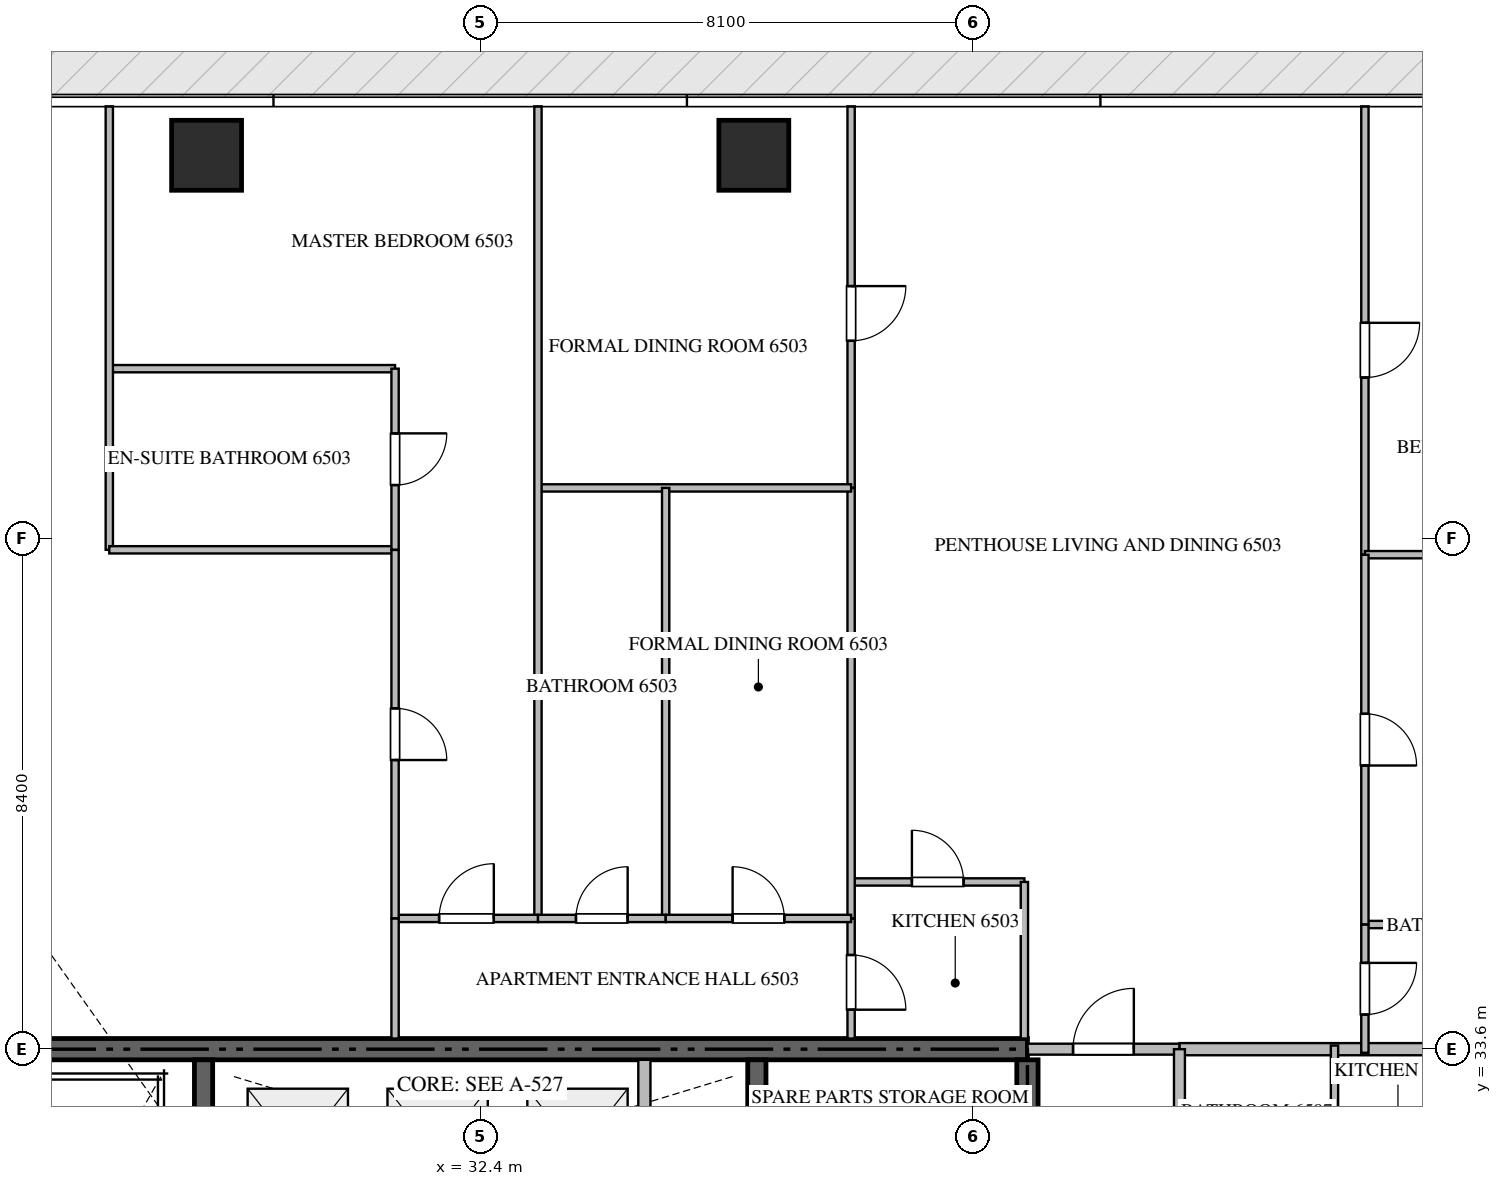
"""IFC4 building model, lengths in metres.
Left out: names, types, materials, properties, quantities, classifications, styles, units other than length and angle.
Written with IfcOpenShell. Run it as: python <this file> out.ifc"""

import sys

from ifc_helpers import new_model, si_unit, direction, frame, frame_2d, origin, origin_2d, place, context, subcontext, project, spatial, rectangle, extrude, source, transform, mapped, element, fill, save


model = new_model("IFC4")
c1 = context("Model", 3, precision=1e-05, world=origin(), true_north=direction((0.0, 1.0)))
c2 = subcontext(c1, "Body", "Model", "MODEL_VIEW")
j1 = project(units=[si_unit("LENGTHUNIT", "METRE"), si_unit("PLANEANGLEUNIT", "RADIAN")], contexts=[c1])
p1 = place(None, origin())
s1 = spatial("IfcSite", under=j1, at=p1, CompositionType="ELEMENT")
p2 = place(p1, origin())
s2 = spatial("IfcBuilding", under=s1, at=p2, CompositionType="ELEMENT")
p3 = place(p2, frame((0.0, 0.0, 260.5)))
s3 = spatial("IfcBuildingStorey", under=s2, at=p3, CompositionType="ELEMENT", Elevation=260.5)
p4 = place(p3, frame((41.4, 33.6, -0.26), z_axis=(0.0, 0.0, 1.0), x_axis=(-1.0, 0.0, 0.0)))
e1 = element("IfcWall", 1, at=p4, inside=s3, PredefinedType="SHEAR", context=c2, shape_type="SweptSolid", body=[
    extrude(rectangle(XDim=18.0, YDim=0.35, at=frame_2d((9.0, 0.0))), origin(), (0.0, 0.0, 1.0), 3.848),
])
p5 = place(p3, frame((41.4, 27.75, -0.26), z_axis=(0.0, 0.0, 1.0), x_axis=(0.0, 1.0, 0.0)))
e2 = element("IfcWall", 2, at=p5, inside=s3, PredefinedType="SHEAR", context=c2, shape_type="SweptSolid", body=[
    extrude(rectangle(XDim=5.675, YDim=0.35, at=frame_2d((2.837, 0.0))), origin(), (0.0, 0.0, 1.0), 3.848),
])
p6 = place(p3, frame((27.85, 23.55, -0.26), z_axis=(0.0, 0.0, 1.0), x_axis=(0.0, 1.0, 0.0)))
e3 = element("IfcWall", 3, at=p6, inside=s3, PredefinedType="SHEAR", context=c2, shape_type="SweptSolid", body=[
    extrude(rectangle(XDim=9.875, YDim=0.3, at=frame_2d((4.938, 0.0))), origin(), (0.0, 0.0, 1.0), 3.848),
])
p7 = place(p3, frame((36.95, 27.05, -0.26), z_axis=(0.0, 0.0, 1.0), x_axis=(0.0, 1.0, 0.0)))
e4 = element("IfcWall", 4, at=p7, inside=s3, PredefinedType="SHEAR", context=c2, shape_type="SweptSolid", body=[
    extrude(rectangle(XDim=6.375, YDim=0.3, at=frame_2d((3.188, 0.0))), origin(), (0.0, 0.0, 1.0), 3.848),
])
m1 = source(origin(), c2, "Body", "SweptSolid", [
    extrude(rectangle(XDim=1.15, YDim=1.15, at=origin_2d()), origin(), (0.0, 0.0, 1.0), 3.85),
])
for number, where, z_axis, x_axis in (
    (5, (27.9, 48.3, -0.26), (0.0, 0.0, 1.0), (1.0, 0.0, 0.0)),
    (6, (36.9, 48.3, -0.26), (0.0, 0.0, 1.0), (1.0, 0.0, 0.0)),
):
    element("IfcColumn", number, at=place(p3, frame(where, z_axis=z_axis, x_axis=x_axis)), inside=s3, PredefinedType="COLUMN", context=c2, shape_type="MappedRepresentation", body=[
        mapped(m1, transform((0.0, 0.0, 0.0), scale=1.0)),
    ])
p8 = place(p3, frame((35.1, 30.75, 0.0), z_axis=(0.0, 0.0, 1.0), x_axis=(0.0, 1.0, 0.0)))
e7 = element("IfcWall", 7, at=p8, inside=s3, PredefinedType="STANDARD", context=c2, shape_type="SweptSolid", body=[
    extrude(rectangle(XDim=2.675, YDim=0.2, at=frame_2d((1.337, 0.0))), origin(), (0.0, 0.0, 1.0), 3.59),
])
p9 = place(p3, frame((43.9, 33.6, 0.0), z_axis=(0.0, 0.0, 1.0), x_axis=(1.0, 0.0, 0.0)))
e8 = element("IfcWall", 8, at=p9, inside=s3, PredefinedType="PARTITIONING", context=c2, shape_type="SweptSolid", body=[
    extrude(rectangle(XDim=13.418, YDim=0.2, at=frame_2d((6.709, 0.0))), origin(), (0.0, 0.0, 1.0), 3.59),
])
p10 = place(p3, frame((41.402, 33.6, 0.0), z_axis=(0.0, 0.0, 1.0), x_axis=(1.0, 0.0, 0.0)))
e9 = element("IfcWall", 9, at=p10, inside=s3, PredefinedType="PARTITIONING", context=c2, shape_type="SweptSolid", body=[
    extrude(rectangle(XDim=2.496, YDim=0.18, at=frame_2d((1.248, 0.0))), origin(), (0.0, 0.0, 1.0), 3.59),
])
p11 = place(p10, frame((0.748, 0.0, 0.0)))
e10 = element("IfcOpeningElement", 10, at=p11, cuts=e9, PredefinedType="OPENING", context=c2, shape_type="SweptSolid", body=[
    extrude(rectangle(XDim=1.0, YDim=2.15, at=frame_2d((0.5, 1.075))), frame((0.0, 0.1, 0.0), z_axis=(0.0, -1.0, 0.0), x_axis=(1.0, 0.0, 0.0)), (0.0, 0.0, 1.0), 0.2),
])
p12 = place(p3, frame((43.9, 16.8, 0.0), z_axis=(0.0, 0.0, 1.0), x_axis=(0.0, 1.0, 0.0)))
e11 = element("IfcWall", 11, at=p12, inside=s3, PredefinedType="PARTITIONING", context=c2, shape_type="SweptSolid", body=[
    extrude(rectangle(XDim=16.8, YDim=0.18, at=frame_2d((8.4, 0.0))), origin(), (0.0, 0.0, 1.0), 3.59),
])
p13 = place(p12, frame((2.575, 0.0, 0.0)))
e12 = element("IfcOpeningElement", 12, at=p13, cuts=e11, PredefinedType="OPENING", context=c2, shape_type="SweptSolid", body=[
    extrude(rectangle(XDim=1.0, YDim=2.15, at=frame_2d((0.5, 1.075))), frame((0.0, 0.1, 0.0), z_axis=(0.0, -1.0, 0.0), x_axis=(1.0, 0.0, 0.0)), (0.0, 0.0, 1.0), 0.2),
])
p14 = place(p12, frame((10.997, 0.0, 0.0)))
e13 = element("IfcOpeningElement", 13, at=p14, cuts=e11, PredefinedType="OPENING", context=c2, shape_type="SweptSolid", body=[
    extrude(rectangle(XDim=1.0, YDim=2.15, at=frame_2d((0.5, 1.075))), frame((0.0, 0.1, 0.0), z_axis=(0.0, -1.0, 0.0), x_axis=(1.0, 0.0, 0.0)), (0.0, 0.0, 1.0), 0.2),
])
p15 = place(p3, frame((38.5, 36.35, 0.0), z_axis=(0.0, 0.0, 1.0), x_axis=(1.0, 0.0, 0.0)))
e14 = element("IfcWall", 14, at=p15, inside=s3, PredefinedType="PARTITIONING", context=c2, shape_type="SweptSolid", body=[
    extrude(rectangle(XDim=2.85, YDim=0.12, at=frame_2d((1.425, 0.0))), origin(), (0.0, 0.0, 1.0), 3.59),
])
p16 = place(p15, frame((1.0, 0.0, 0.0)))
e15 = element("IfcOpeningElement", 15, at=p16, cuts=e14, PredefinedType="OPENING", context=c2, shape_type="SweptSolid", body=[
    extrude(rectangle(XDim=0.85, YDim=2.1, at=frame_2d((0.425, 1.05))), frame((0.0, 0.07, 0.0), z_axis=(0.0, -1.0, 0.0), x_axis=(1.0, 0.0, 0.0)), (0.0, 0.0, 1.0), 0.14),
])
p17 = place(p3, frame((41.35, 36.35, 0.0), z_axis=(0.0, 0.0, 1.0), x_axis=(0.0, -1.0, 0.0)))
e16 = element("IfcWall", 16, at=p17, inside=s3, PredefinedType="PARTITIONING", context=c2, shape_type="SweptSolid", body=[
    extrude(rectangle(XDim=2.575, YDim=0.12, at=frame_2d((1.288, 0.0))), origin(), (0.0, 0.0, 1.0), 3.59),
])
p18 = place(p3, frame((38.5, 35.75, 0.0), z_axis=(0.0, 0.0, 1.0), x_axis=(0.0, -1.0, 0.0)))
e17 = element("IfcWall", 17, at=p18, inside=s3, PredefinedType="PARTITIONING", context=c2, shape_type="SweptSolid", body=[
    extrude(rectangle(XDim=1.975, YDim=0.12, at=frame_2d((0.988, 0.0))), origin(), (0.0, 0.0, 1.0), 3.59),
])
p19 = place(p18, frame((0.601, 0.0, 0.0)))
e18 = element("IfcOpeningElement", 18, at=p19, cuts=e17, PredefinedType="OPENING", context=c2, shape_type="SweptSolid", body=[
    extrude(rectangle(XDim=0.9, YDim=2.1, at=frame_2d((0.45, 1.05))), frame((0.0, 0.07, 0.0), z_axis=(0.0, -1.0, 0.0), x_axis=(1.0, 0.0, 0.0)), (0.0, 0.0, 1.0), 0.14),
])
p20 = place(p3, frame((38.5, 49.105, 0.0), z_axis=(0.0, 0.0, 1.0), x_axis=(0.0, -1.0, 0.0)))
e19 = element("IfcWall", 19, at=p20, inside=s3, PredefinedType="PARTITIONING", context=c2, shape_type="SweptSolid", body=[
    extrude(rectangle(XDim=6.275, YDim=0.12, at=frame_2d((3.137, 0.0))), origin(), (0.0, 0.0, 1.0), 3.59),
])
p21 = place(p20, frame((2.956, 0.0, 0.0)))
e20 = element("IfcOpeningElement", 20, at=p21, cuts=e19, PredefinedType="OPENING", context=c2, shape_type="SweptSolid", body=[
    extrude(rectangle(XDim=0.9, YDim=2.1, at=frame_2d((0.45, 1.05))), frame((0.0, 0.07, 0.0), z_axis=(0.0, -1.0, 0.0), x_axis=(1.0, 0.0, 0.0)), (0.0, 0.0, 1.0), 0.14),
])
p22 = place(p3, frame((38.5, 42.828, 0.0), z_axis=(0.0, 0.0, 1.0), x_axis=(0.0, -1.0, 0.0)))
e21 = element("IfcWall", 21, at=p22, inside=s3, PredefinedType="PARTITIONING", context=c2, shape_type="SweptSolid", body=[
    extrude(rectangle(XDim=7.076, YDim=0.12, at=frame_2d((3.538, 0.0))), origin(), (0.0, 0.0, 1.0), 3.59),
])
p23 = place(p3, frame((33.35, 42.83, 0.0), z_axis=(0.0, 0.0, 1.0), x_axis=(1.0, 0.0, 0.0)))
e22 = element("IfcWall", 22, at=p23, inside=s3, PredefinedType="PARTITIONING", context=c2, shape_type="SweptSolid", body=[
    extrude(rectangle(XDim=5.15, YDim=0.12, at=frame_2d((2.575, 0.0))), origin(), (0.0, 0.0, 1.0), 3.59),
])
p24 = place(p3, frame((33.35, 49.105, 0.0), z_axis=(0.0, 0.0, 1.0), x_axis=(0.0, -1.0, 0.0)))
e23 = element("IfcWall", 23, at=p24, inside=s3, PredefinedType="PARTITIONING", context=c2, shape_type="SweptSolid", body=[
    extrude(rectangle(XDim=13.355, YDim=0.12, at=frame_2d((6.677, 0.0))), origin(), (0.0, 0.0, 1.0), 3.59),
])
p25 = place(p3, frame((35.45, 42.83, 0.0), z_axis=(0.0, 0.0, 1.0), x_axis=(0.0, -1.0, 0.0)))
e24 = element("IfcWall", 24, at=p25, inside=s3, PredefinedType="PARTITIONING", context=c2, shape_type="SweptSolid", body=[
    extrude(rectangle(XDim=7.08, YDim=0.12, at=frame_2d((3.54, 0.0))), origin(), (0.0, 0.0, 1.0), 3.59),
])
p26 = place(p3, frame((33.35, 35.75, 0.0), z_axis=(0.0, 0.0, 1.0), x_axis=(1.0, 0.0, 0.0)))
e25 = element("IfcWall", 25, at=p26, inside=s3, PredefinedType="PARTITIONING", context=c2, shape_type="SweptSolid", body=[
    extrude(rectangle(XDim=2.1, YDim=0.12, at=frame_2d((1.05, 0.0))), origin(), (0.0, 0.0, 1.0), 3.59),
])
p27 = place(p26, frame((0.625, 0.0, 0.0)))
e26 = element("IfcOpeningElement", 26, at=p27, cuts=e25, PredefinedType="OPENING", context=c2, shape_type="SweptSolid", body=[
    extrude(rectangle(XDim=0.85, YDim=2.1, at=frame_2d((0.425, 1.05))), frame((0.0, 0.07, 0.0), z_axis=(0.0, -1.0, 0.0), x_axis=(1.0, 0.0, 0.0)), (0.0, 0.0, 1.0), 0.14),
])
p28 = place(p3, frame((35.452, 35.75, 0.0), z_axis=(0.0, 0.0, 1.0), x_axis=(1.0, 0.0, 0.0)))
e27 = element("IfcWall", 27, at=p28, inside=s3, PredefinedType="PARTITIONING", context=c2, shape_type="SweptSolid", body=[
    extrude(rectangle(XDim=3.048, YDim=0.12, at=frame_2d((1.524, 0.0))), origin(), (0.0, 0.0, 1.0), 3.59),
])
p29 = place(p28, frame((1.099, 0.0, 0.0)))
e28 = element("IfcOpeningElement", 28, at=p29, cuts=e27, PredefinedType="OPENING", context=c2, shape_type="SweptSolid", body=[
    extrude(rectangle(XDim=0.85, YDim=2.1, at=frame_2d((0.425, 1.05))), frame((0.0, 0.07, 0.0), z_axis=(0.0, -1.0, 0.0), x_axis=(1.0, 0.0, 0.0)), (0.0, 0.0, 1.0), 0.14),
])
p30 = place(p3, frame((31.0, 35.75, 0.0), z_axis=(0.0, 0.0, 1.0), x_axis=(1.0, 0.0, 0.0)))
e29 = element("IfcWall", 29, at=p30, inside=s3, PredefinedType="PARTITIONING", context=c2, shape_type="SweptSolid", body=[
    extrude(rectangle(XDim=2.348, YDim=0.12, at=frame_2d((1.174, 0.0))), origin(), (0.0, 0.0, 1.0), 3.59),
])
p31 = place(p30, frame((0.724, 0.0, 0.0)))
e30 = element("IfcOpeningElement", 30, at=p31, cuts=e29, PredefinedType="OPENING", context=c2, shape_type="SweptSolid", body=[
    extrude(rectangle(XDim=0.9, YDim=2.1, at=frame_2d((0.45, 1.05))), frame((0.0, 0.07, 0.0), z_axis=(0.0, -1.0, 0.0), x_axis=(1.0, 0.0, 0.0)), (0.0, 0.0, 1.0), 0.14),
])
p32 = place(p3, frame((26.3, 44.791, 0.0), z_axis=(0.0, 0.0, 1.0), x_axis=(1.0, 0.0, 0.0)))
e31 = element("IfcWall", 31, at=p32, inside=s3, PredefinedType="PARTITIONING", context=c2, shape_type="SweptSolid", body=[
    extrude(rectangle(XDim=4.7, YDim=0.12, at=frame_2d((2.35, 0.0))), origin(), (0.0, 0.0, 1.0), 3.59),
])
p33 = place(p3, frame((26.3, 49.105, 0.0), z_axis=(0.0, 0.0, 1.0), x_axis=(0.0, -1.0, 0.0)))
e32 = element("IfcWall", 32, at=p33, inside=s3, PredefinedType="PARTITIONING", context=c2, shape_type="SweptSolid", body=[
    extrude(rectangle(XDim=7.293, YDim=0.12, at=frame_2d((3.646, 0.0))), origin(), (0.0, 0.0, 1.0), 3.59),
])
p34 = place(p3, frame((26.3, 41.812, 0.0), z_axis=(0.0, 0.0, 1.0), x_axis=(1.0, 0.0, 0.0)))
e33 = element("IfcWall", 33, at=p34, inside=s3, PredefinedType="PARTITIONING", context=c2, shape_type="SweptSolid", body=[
    extrude(rectangle(XDim=4.7, YDim=0.12, at=frame_2d((2.35, 0.0))), origin(), (0.0, 0.0, 1.0), 3.59),
])
p35 = place(p3, frame((31.0, 44.791, 0.0), z_axis=(0.0, 0.0, 1.0), x_axis=(0.0, -1.0, 0.0)))
e34 = element("IfcWall", 34, at=p35, inside=s3, PredefinedType="PARTITIONING", context=c2, shape_type="SweptSolid", body=[
    extrude(rectangle(XDim=2.979, YDim=0.12, at=frame_2d((1.49, 0.0))), origin(), (0.0, 0.0, 1.0), 3.59),
])
p36 = place(p35, frame((1.064, 0.0, 0.0)))
e35 = element("IfcOpeningElement", 35, at=p36, cuts=e34, PredefinedType="OPENING", context=c2, shape_type="SweptSolid", body=[
    extrude(rectangle(XDim=0.85, YDim=2.1, at=frame_2d((0.425, 1.05))), frame((0.0, 0.07, 0.0), z_axis=(0.0, -1.0, 0.0), x_axis=(1.0, 0.0, 0.0)), (0.0, 0.0, 1.0), 0.14),
])
p37 = place(p3, frame((31.0, 41.81, 0.0), z_axis=(0.0, 0.0, 1.0), x_axis=(0.0, -1.0, 0.0)))
e36 = element("IfcWall", 36, at=p37, inside=s3, PredefinedType="PARTITIONING", context=c2, shape_type="SweptSolid", body=[
    extrude(rectangle(XDim=6.06, YDim=0.12, at=frame_2d((3.03, 0.0))), origin(), (0.0, 0.0, 1.0), 3.59),
])
p38 = place(p37, frame((2.605, 0.0, 0.0)))
e37 = element("IfcOpeningElement", 37, at=p38, cuts=e36, PredefinedType="OPENING", context=c2, shape_type="SweptSolid", body=[
    extrude(rectangle(XDim=0.85, YDim=2.1, at=frame_2d((0.425, 1.05))), frame((0.0, 0.07, 0.0), z_axis=(0.0, -1.0, 0.0), x_axis=(1.0, 0.0, 0.0)), (0.0, 0.0, 1.0), 0.14),
])
p39 = place(p3, frame((31.0, 35.748, 0.0), z_axis=(0.0, 0.0, 1.0), x_axis=(0.0, -1.0, 0.0)))
e38 = element("IfcWall", 38, at=p39, inside=s3, PredefinedType="PARTITIONING", context=c2, shape_type="SweptSolid", body=[
    extrude(rectangle(XDim=1.973, YDim=0.12, at=frame_2d((0.987, 0.0))), origin(), (0.0, 0.0, 1.0), 3.59),
])
p40 = place(p3, frame((46.95, 49.105, 0.0), z_axis=(0.0, 0.0, 1.0), x_axis=(0.0, -1.0, 0.0)))
e39 = element("IfcWall", 39, at=p40, inside=s3, PredefinedType="PARTITIONING", context=c2, shape_type="SweptSolid", body=[
    extrude(rectangle(XDim=7.373, YDim=0.12, at=frame_2d((3.687, 0.0))), origin(), (0.0, 0.0, 1.0), 3.59),
])
p41 = place(p40, frame((3.56, 0.0, 0.0)))
e40 = element("IfcOpeningElement", 40, at=p41, cuts=e39, PredefinedType="OPENING", context=c2, shape_type="SweptSolid", body=[
    extrude(rectangle(XDim=0.9, YDim=2.1, at=frame_2d((0.45, 1.05))), frame((0.0, 0.07, 0.0), z_axis=(0.0, -1.0, 0.0), x_axis=(1.0, 0.0, 0.0)), (0.0, 0.0, 1.0), 0.14),
])
p42 = place(p3, frame((46.95, 41.732, 0.0), z_axis=(0.0, 0.0, 1.0), x_axis=(1.0, 0.0, 0.0)))
e41 = element("IfcWall", 41, at=p42, inside=s3, PredefinedType="PARTITIONING", context=c2, shape_type="SweptSolid", body=[
    extrude(rectangle(XDim=6.355, YDim=0.12, at=frame_2d((3.177, 0.0))), origin(), (0.0, 0.0, 1.0), 3.59),
])
p43 = place(p3, frame((46.95, 35.65, 0.0), z_axis=(0.0, 0.0, 1.0), x_axis=(1.0, 0.0, 0.0)))
e42 = element("IfcWall", 42, at=p43, inside=s3, PredefinedType="PARTITIONING", context=c2, shape_type="SweptSolid", body=[
    extrude(rectangle(XDim=3.2, YDim=0.12, at=frame_2d((1.6, 0.0))), origin(), (0.0, 0.0, 1.0), 3.59),
])
p44 = place(p3, frame((46.95, 41.73, 0.0), z_axis=(0.0, 0.0, 1.0), x_axis=(0.0, -1.0, 0.0)))
e43 = element("IfcWall", 43, at=p44, inside=s3, PredefinedType="PARTITIONING", context=c2, shape_type="SweptSolid", body=[
    extrude(rectangle(XDim=6.08, YDim=0.12, at=frame_2d((3.04, 0.0))), origin(), (0.0, 0.0, 1.0), 3.59),
])
p45 = place(p44, frame((2.615, 0.0, 0.0)))
e44 = element("IfcOpeningElement", 44, at=p45, cuts=e43, PredefinedType="OPENING", context=c2, shape_type="SweptSolid", body=[
    extrude(rectangle(XDim=0.85, YDim=2.1, at=frame_2d((0.425, 1.05))), frame((0.0, 0.07, 0.0), z_axis=(0.0, -1.0, 0.0), x_axis=(1.0, 0.0, 0.0)), (0.0, 0.0, 1.0), 0.14),
])
p46 = place(p3, frame((46.95, 35.648, 0.0), z_axis=(0.0, 0.0, 1.0), x_axis=(0.0, -1.0, 0.0)))
e45 = element("IfcWall", 45, at=p46, inside=s3, PredefinedType="PARTITIONING", context=c2, shape_type="SweptSolid", body=[
    extrude(rectangle(XDim=2.108, YDim=0.12, at=frame_2d((1.054, 0.0))), origin(), (0.0, 0.0, 1.0), 3.59),
])
p47 = place(p46, frame((0.629, 0.0, 0.0)))
e46 = element("IfcOpeningElement", 46, at=p47, cuts=e45, PredefinedType="OPENING", context=c2, shape_type="SweptSolid", body=[
    extrude(rectangle(XDim=0.85, YDim=2.1, at=frame_2d((0.425, 1.05))), frame((0.0, 0.07, 0.0), z_axis=(0.0, -1.0, 0.0), x_axis=(1.0, 0.0, 0.0)), (0.0, 0.0, 1.0), 0.14),
])
p48 = place(p3, frame((46.45, 31.0, 0.0), z_axis=(0.0, 0.0, 1.0), x_axis=(0.0, 1.0, 0.0)))
e47 = element("IfcWall", 47, at=p48, inside=s3, PredefinedType="PARTITIONING", context=c2, shape_type="SweptSolid", body=[
    extrude(rectangle(XDim=2.66, YDim=0.12, at=frame_2d((1.33, 0.0))), origin(), (0.0, 0.0, 1.0), 3.59),
])
m2 = source(origin(), c2, "Body", "SweptSolid", [
    extrude(rectangle(XDim=1.0, YDim=2.15, at=frame_2d((0.5, 1.075))), frame((0.0, 0.025, 0.0), z_axis=(0.0, -1.0, 0.0), x_axis=(1.0, 0.0, 0.0)), (0.0, 0.0, 1.0), 0.05),
])
p49 = place(p11, origin())
e48 = element("IfcDoor", 48, at=p49, inside=s3, OperationType="SINGLE_SWING_RIGHT", PredefinedType="DOOR", context=c2, shape_type="MappedRepresentation", body=[
    mapped(m2, transform((0.0, 0.0, 0.0), scale=1.0)),
])
fill(e10, e48)
m3 = source(origin(), c2, "Body", "SweptSolid", [
    extrude(rectangle(XDim=0.85, YDim=2.1, at=frame_2d((0.425, 1.05))), frame((0.0, 0.025, 0.0), z_axis=(0.0, -1.0, 0.0), x_axis=(1.0, 0.0, 0.0)), (0.0, 0.0, 1.0), 0.05),
])
p50 = place(p16, origin())
e49 = element("IfcDoor", 49, at=p50, inside=s3, OperationType="SINGLE_SWING_LEFT", PredefinedType="DOOR", context=c2, shape_type="MappedRepresentation", body=[
    mapped(m3, transform((0.0, 0.0, 0.0), scale=1.0)),
])
fill(e15, e49)
m4 = source(origin(), c2, "Body", "SweptSolid", [
    extrude(rectangle(XDim=0.9, YDim=2.1, at=frame_2d((0.45, 1.05))), frame((0.0, 0.025, 0.0), z_axis=(0.0, -1.0, 0.0), x_axis=(1.0, 0.0, 0.0)), (0.0, 0.0, 1.0), 0.05),
])
p51 = place(p19, origin())
e50 = element("IfcDoor", 50, at=p51, inside=s3, OperationType="SINGLE_SWING_RIGHT", PredefinedType="DOOR", context=c2, shape_type="MappedRepresentation", body=[
    mapped(m4, transform((0.0, 0.0, 0.0), scale=1.0)),
])
fill(e18, e50)
p52 = place(p21, origin())
e51 = element("IfcDoor", 51, at=p52, inside=s3, OperationType="SINGLE_SWING_LEFT", PredefinedType="DOOR", context=c2, shape_type="MappedRepresentation", body=[
    mapped(m4, transform((0.0, 0.0, 0.0), scale=1.0)),
])
fill(e20, e51)
p53 = place(p27, origin())
e52 = element("IfcDoor", 52, at=p53, inside=s3, OperationType="SINGLE_SWING_RIGHT", PredefinedType="DOOR", context=c2, shape_type="MappedRepresentation", body=[
    mapped(m3, transform((0.0, 0.0, 0.0), scale=1.0)),
])
fill(e26, e52)
p54 = place(p29, origin())
e53 = element("IfcDoor", 53, at=p54, inside=s3, OperationType="SINGLE_SWING_LEFT", PredefinedType="DOOR", context=c2, shape_type="MappedRepresentation", body=[
    mapped(m3, transform((0.0, 0.0, 0.0), scale=1.0)),
])
fill(e28, e53)
p55 = place(p31, origin())
e54 = element("IfcDoor", 54, at=p55, inside=s3, OperationType="SINGLE_SWING_RIGHT", PredefinedType="DOOR", context=c2, shape_type="MappedRepresentation", body=[
    mapped(m4, transform((0.0, 0.0, 0.0), scale=1.0)),
])
fill(e30, e54)
p56 = place(p36, origin())
e55 = element("IfcDoor", 55, at=p56, inside=s3, OperationType="SINGLE_SWING_LEFT", PredefinedType="DOOR", context=c2, shape_type="MappedRepresentation", body=[
    mapped(m3, transform((0.0, 0.0, 0.0), scale=1.0)),
])
fill(e35, e55)
p57 = place(p38, origin())
e56 = element("IfcDoor", 56, at=p57, inside=s3, OperationType="SINGLE_SWING_RIGHT", PredefinedType="DOOR", context=c2, shape_type="MappedRepresentation", body=[
    mapped(m3, transform((0.0, 0.0, 0.0), scale=1.0)),
])
fill(e37, e56)
p58 = place(p41, origin())
e57 = element("IfcDoor", 57, at=p58, inside=s3, OperationType="SINGLE_SWING_LEFT", PredefinedType="DOOR", context=c2, shape_type="MappedRepresentation", body=[
    mapped(m4, transform((0.0, 0.0, 0.0), scale=1.0)),
])
fill(e40, e57)
p59 = place(p45, origin())
e58 = element("IfcDoor", 58, at=p59, inside=s3, OperationType="SINGLE_SWING_RIGHT", PredefinedType="DOOR", context=c2, shape_type="MappedRepresentation", body=[
    mapped(m3, transform((0.0, 0.0, 0.0), scale=1.0)),
])
fill(e44, e58)
p60 = place(p47, origin())
e59 = element("IfcDoor", 59, at=p60, inside=s3, OperationType="SINGLE_SWING_LEFT", PredefinedType="DOOR", context=c2, shape_type="MappedRepresentation", body=[
    mapped(m3, transform((0.0, 0.0, 0.0), scale=1.0)),
])
fill(e46, e59)
save(model, sys.argv[1])
